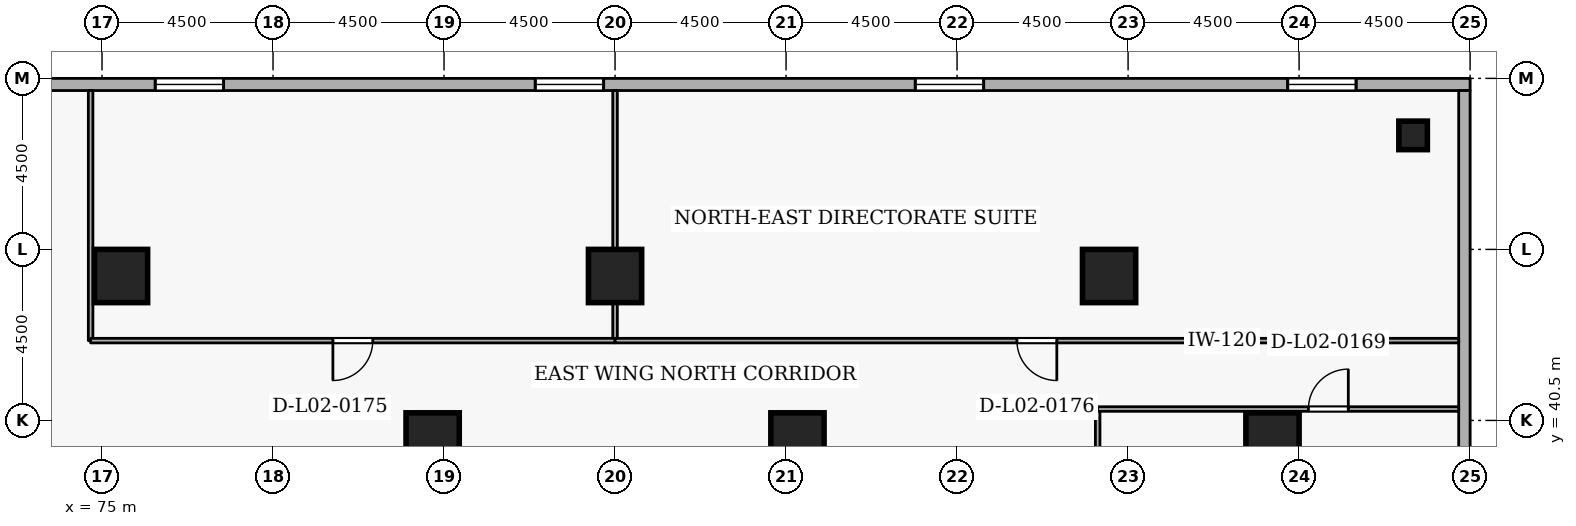
"""IFC4 building model, lengths in metres.
Left out: names, types, materials, properties, quantities, classifications, styles, units other than length and angle.
Written with IfcOpenShell. Run it as: python <this file> out.ifc"""

import sys

from ifc_helpers import new_model, si_unit, direction, frame, frame_2d, origin, origin_2d, place, context, subcontext, project, spatial, rectangle, extrude, element, fill, save


model = new_model("IFC4")
c1 = context("Model", 3, precision=1e-05, world=origin(), true_north=direction((0.0, 1.0)))
c2 = subcontext(c1, "Body", "Model", "MODEL_VIEW")
j1 = project(units=[si_unit("LENGTHUNIT", "METRE"), si_unit("PLANEANGLEUNIT", "RADIAN")], contexts=[c1])
p1 = place(None, origin())
s1 = spatial("IfcSite", under=j1, at=p1, CompositionType="ELEMENT")
p2 = place(p1, origin())
s2 = spatial("IfcBuilding", under=s1, at=p2, CompositionType="ELEMENT")
p3 = place(p2, frame((0.0, 0.0, 9.6)))
s3 = spatial("IfcBuildingStorey", under=s2, at=p3, CompositionType="ELEMENT", Elevation=9.6)
for number, where, z_axis, x_axis in (
    (1, (105.8, 40.0, 0.0), (0.0, 0.0, 1.0), (1.0, 0.0, 0.0)),
    (2, (101.5, 44.3, 0.0), (0.0, 0.0, 1.0), (1.0, 0.0, 0.0)),
    (3, (88.5, 44.3, 0.0), (0.0, 0.0, 1.0), (1.0, 0.0, 0.0)),
    (4, (75.5, 44.3, 0.0), (0.0, 0.0, 1.0), (1.0, 0.0, 0.0)),
    (5, (93.3, 40.0, 0.0), (0.0, 0.0, 1.0), (1.0, 0.0, 0.0)),
    (6, (83.7, 40.0, 0.0), (0.0, 0.0, 1.0), (1.0, 0.0, 0.0)),
):
    element("IfcColumn", number, at=place(p3, frame(where, z_axis=z_axis, x_axis=x_axis)), inside=s3, PredefinedType="COLUMN", context=c2, shape_type="SweptSolid", body=[
        extrude(rectangle(XDim=1.4, YDim=1.4, at=origin_2d()), origin(), (0.0, 0.0, 1.0), 4.5),
    ])
p4 = place(p3, frame((109.5, 48.0, 0.0), z_axis=(0.0, 0.0, 1.0), x_axis=(1.0, 0.0, 0.0)))
e7 = element("IfcColumn", 7, at=p4, inside=s3, PredefinedType="COLUMN", context=c2, shape_type="SweptSolid", body=[
    extrude(rectangle(XDim=0.75, YDim=0.75, at=origin_2d()), origin(), (0.0, 0.0, 1.0), 4.5),
])
p5 = place(p3, frame((111.0, 49.34, 0.0), z_axis=(0.0, 0.0, 1.0), x_axis=(-1.0, 0.0, 0.0)))
e8 = element("IfcWall", 8, at=p5, inside=s3, PredefinedType="STANDARD", context=c2, shape_type="SweptSolid", body=[
    extrude(rectangle(XDim=39.4, YDim=0.32, at=frame_2d((19.7, 0.0))), origin(), (0.0, 0.0, 1.0), 3.56),
])
p6 = place(p5, frame((3.0, 0.0, 0.78)))
e9 = element("IfcOpeningElement", 9, at=p6, cuts=e8, PredefinedType="OPENING", context=c2, shape_type="SweptSolid", body=[
    extrude(rectangle(XDim=1.8, YDim=2.15, at=frame_2d((0.9, 1.075))), frame((0.0, 0.17, 0.0), z_axis=(0.0, -1.0, 0.0), x_axis=(1.0, 0.0, 0.0)), (0.0, 0.0, 1.0), 0.34),
])
p7 = place(p5, frame((12.8, 0.0, 0.78)))
e10 = element("IfcOpeningElement", 10, at=p7, cuts=e8, PredefinedType="OPENING", context=c2, shape_type="SweptSolid", body=[
    extrude(rectangle(XDim=1.8, YDim=2.15, at=frame_2d((0.9, 1.075))), frame((0.0, 0.17, 0.0), z_axis=(0.0, -1.0, 0.0), x_axis=(1.0, 0.0, 0.0)), (0.0, 0.0, 1.0), 0.34),
])
p8 = place(p5, frame((22.8, 0.0, 0.78)))
e11 = element("IfcOpeningElement", 11, at=p8, cuts=e8, PredefinedType="OPENING", context=c2, shape_type="SweptSolid", body=[
    extrude(rectangle(XDim=1.8, YDim=2.15, at=frame_2d((0.9, 1.075))), frame((0.0, 0.17, 0.0), z_axis=(0.0, -1.0, 0.0), x_axis=(1.0, 0.0, 0.0)), (0.0, 0.0, 1.0), 0.34),
])
p9 = place(p5, frame((32.8, 0.0, 0.78)))
e12 = element("IfcOpeningElement", 12, at=p9, cuts=e8, PredefinedType="OPENING", context=c2, shape_type="SweptSolid", body=[
    extrude(rectangle(XDim=1.8, YDim=2.15, at=frame_2d((0.9, 1.075))), frame((0.0, 0.17, 0.0), z_axis=(0.0, -1.0, 0.0), x_axis=(1.0, 0.0, 0.0)), (0.0, 0.0, 1.0), 0.34),
])
p10 = place(p3, frame((110.85, 7.82, 0.0), z_axis=(0.0, 0.0, 1.0), x_axis=(0.0, 1.0, 0.0)))
e13 = element("IfcWall", 13, at=p10, inside=s3, PredefinedType="STANDARD", context=c2, shape_type="SweptSolid", body=[
    extrude(rectangle(XDim=41.36, YDim=0.3, at=frame_2d((20.68, 0.0))), origin(), (0.0, 0.0, 1.0), 3.56),
])
p11 = place(p3, frame((101.2, 27.0, 0.0), z_axis=(0.0, 0.0, 1.0), x_axis=(0.0, 1.0, 0.0)))
e14 = element("IfcWall", 14, at=p11, inside=s3, PredefinedType="PARTITIONING", context=c2, shape_type="SweptSolid", body=[
    extrude(rectangle(XDim=13.8, YDim=0.12, at=frame_2d((6.9, 0.0))), origin(), (0.0, 0.0, 1.0), 4.16),
])
p12 = place(p3, frame((101.2, 40.8, 0.0), z_axis=(0.0, 0.0, 1.0), x_axis=(1.0, 0.0, 0.0)))
e15 = element("IfcWall", 15, at=p12, inside=s3, PredefinedType="PARTITIONING", context=c2, shape_type="SweptSolid", body=[
    extrude(rectangle(XDim=9.5, YDim=0.12, at=frame_2d((4.75, 0.0))), origin(), (0.0, 0.0, 1.0), 4.16),
])
p13 = place(p12, frame((5.545, 0.0, 0.0)))
e16 = element("IfcOpeningElement", 16, at=p13, cuts=e15, PredefinedType="OPENING", context=c2, shape_type="SweptSolid", body=[
    extrude(rectangle(XDim=1.05, YDim=2.1, at=frame_2d((0.525, 1.05))), frame((0.0, 0.07, 0.0), z_axis=(0.0, -1.0, 0.0), x_axis=(1.0, 0.0, 0.0)), (0.0, 0.0, 1.0), 0.14),
])
for number, where, z_axis, x_axis in (
    (17, (74.7, 42.6, 0.0), (0.0, 0.0, 1.0), (0.0, 1.0, 0.0)),
    (18, (88.5, 49.18, 0.0), (0.0, 0.0, 1.0), (0.0, -1.0, 0.0)),
):
    element("IfcWall", number, at=place(p3, frame(where, z_axis=z_axis, x_axis=x_axis)), inside=s3, PredefinedType="PARTITIONING", context=c2, shape_type="SweptSolid", body=[
        extrude(rectangle(XDim=6.58, YDim=0.12, at=frame_2d((3.29, 0.0))), origin(), (0.0, 0.0, 1.0), 4.16),
    ])
p14 = place(p3, frame((88.5, 42.6, 0.0), z_axis=(0.0, 0.0, 1.0), x_axis=(-1.0, 0.0, 0.0)))
e19 = element("IfcWall", 19, at=p14, inside=s3, PredefinedType="PARTITIONING", context=c2, shape_type="SweptSolid", body=[
    extrude(rectangle(XDim=13.8, YDim=0.12, at=frame_2d((6.9, 0.0))), origin(), (0.0, 0.0, 1.0), 4.16),
])
p15 = place(p14, frame((6.375, 0.0, 0.0)))
e20 = element("IfcOpeningElement", 20, at=p15, cuts=e19, PredefinedType="OPENING", context=c2, shape_type="SweptSolid", body=[
    extrude(rectangle(XDim=1.05, YDim=2.1, at=frame_2d((0.525, 1.05))), frame((0.0, 0.07, 0.0), z_axis=(0.0, -1.0, 0.0), x_axis=(1.0, 0.0, 0.0)), (0.0, 0.0, 1.0), 0.14),
])
p16 = place(p3, frame((110.7, 42.6, 0.0), z_axis=(0.0, 0.0, 1.0), x_axis=(-1.0, 0.0, 0.0)))
e21 = element("IfcWall", 21, at=p16, inside=s3, PredefinedType="PARTITIONING", context=c2, shape_type="SweptSolid", body=[
    extrude(rectangle(XDim=22.2, YDim=0.12, at=frame_2d((11.1, 0.0))), origin(), (0.0, 0.0, 1.0), 4.16),
])
p17 = place(p16, frame((10.575, 0.0, 0.0)))
e22 = element("IfcOpeningElement", 22, at=p17, cuts=e21, PredefinedType="OPENING", context=c2, shape_type="SweptSolid", body=[
    extrude(rectangle(XDim=1.05, YDim=2.1, at=frame_2d((0.525, 1.05))), frame((0.0, 0.07, 0.0), z_axis=(0.0, -1.0, 0.0), x_axis=(1.0, 0.0, 0.0)), (0.0, 0.0, 1.0), 0.14),
])
p18 = place(p6, origin())
e23 = element("IfcWindow", 23, at=p18, inside=s3, PartitioningType="SINGLE_PANEL", PredefinedType="WINDOW", context=c2, shape_type="SweptSolid", body=[
    extrude(rectangle(XDim=1.8, YDim=2.15, at=frame_2d((0.9, 1.075))), frame((0.0, 0.03, 0.0), z_axis=(0.0, -1.0, 0.0), x_axis=(1.0, 0.0, 0.0)), (0.0, 0.0, 1.0), 0.06),
])
fill(e9, e23)
p19 = place(p7, origin())
e24 = element("IfcWindow", 24, at=p19, inside=s3, PartitioningType="SINGLE_PANEL", PredefinedType="WINDOW", context=c2, shape_type="SweptSolid", body=[
    extrude(rectangle(XDim=1.8, YDim=2.15, at=frame_2d((0.9, 1.075))), frame((0.0, 0.03, 0.0), z_axis=(0.0, -1.0, 0.0), x_axis=(1.0, 0.0, 0.0)), (0.0, 0.0, 1.0), 0.06),
])
fill(e10, e24)
p20 = place(p8, origin())
e25 = element("IfcWindow", 25, at=p20, inside=s3, PartitioningType="SINGLE_PANEL", PredefinedType="WINDOW", context=c2, shape_type="SweptSolid", body=[
    extrude(rectangle(XDim=1.8, YDim=2.15, at=frame_2d((0.9, 1.075))), frame((0.0, 0.03, 0.0), z_axis=(0.0, -1.0, 0.0), x_axis=(1.0, 0.0, 0.0)), (0.0, 0.0, 1.0), 0.06),
])
fill(e11, e25)
p21 = place(p9, origin())
e26 = element("IfcWindow", 26, at=p21, inside=s3, PartitioningType="SINGLE_PANEL", PredefinedType="WINDOW", context=c2, shape_type="SweptSolid", body=[
    extrude(rectangle(XDim=1.8, YDim=2.15, at=frame_2d((0.9, 1.075))), frame((0.0, 0.03, 0.0), z_axis=(0.0, -1.0, 0.0), x_axis=(1.0, 0.0, 0.0)), (0.0, 0.0, 1.0), 0.06),
])
fill(e12, e26)
p22 = place(p13, origin())
e27 = element("IfcDoor", 27, at=p22, inside=s3, OperationType="SINGLE_SWING_RIGHT", PredefinedType="DOOR", context=c2, shape_type="SweptSolid", body=[
    extrude(rectangle(XDim=1.05, YDim=2.1, at=frame_2d((0.525, 1.05))), frame((0.0, 0.025, 0.0), z_axis=(0.0, -1.0, 0.0), x_axis=(1.0, 0.0, 0.0)), (0.0, 0.0, 1.0), 0.05),
])
fill(e16, e27)
p23 = place(p15, origin())
e28 = element("IfcDoor", 28, at=p23, inside=s3, OperationType="SINGLE_SWING_RIGHT", PredefinedType="DOOR", context=c2, shape_type="SweptSolid", body=[
    extrude(rectangle(XDim=1.05, YDim=2.1, at=frame_2d((0.525, 1.05))), frame((0.0, 0.025, 0.0), z_axis=(0.0, -1.0, 0.0), x_axis=(1.0, 0.0, 0.0)), (0.0, 0.0, 1.0), 0.05),
])
fill(e20, e28)
p24 = place(p17, origin())
e29 = element("IfcDoor", 29, at=p24, inside=s3, OperationType="SINGLE_SWING_LEFT", PredefinedType="DOOR", context=c2, shape_type="SweptSolid", body=[
    extrude(rectangle(XDim=1.05, YDim=2.1, at=frame_2d((0.525, 1.05))), frame((0.0, 0.025, 0.0), z_axis=(0.0, -1.0, 0.0), x_axis=(1.0, 0.0, 0.0)), (0.0, 0.0, 1.0), 0.05),
])
fill(e22, e29)
save(model, sys.argv[1])
